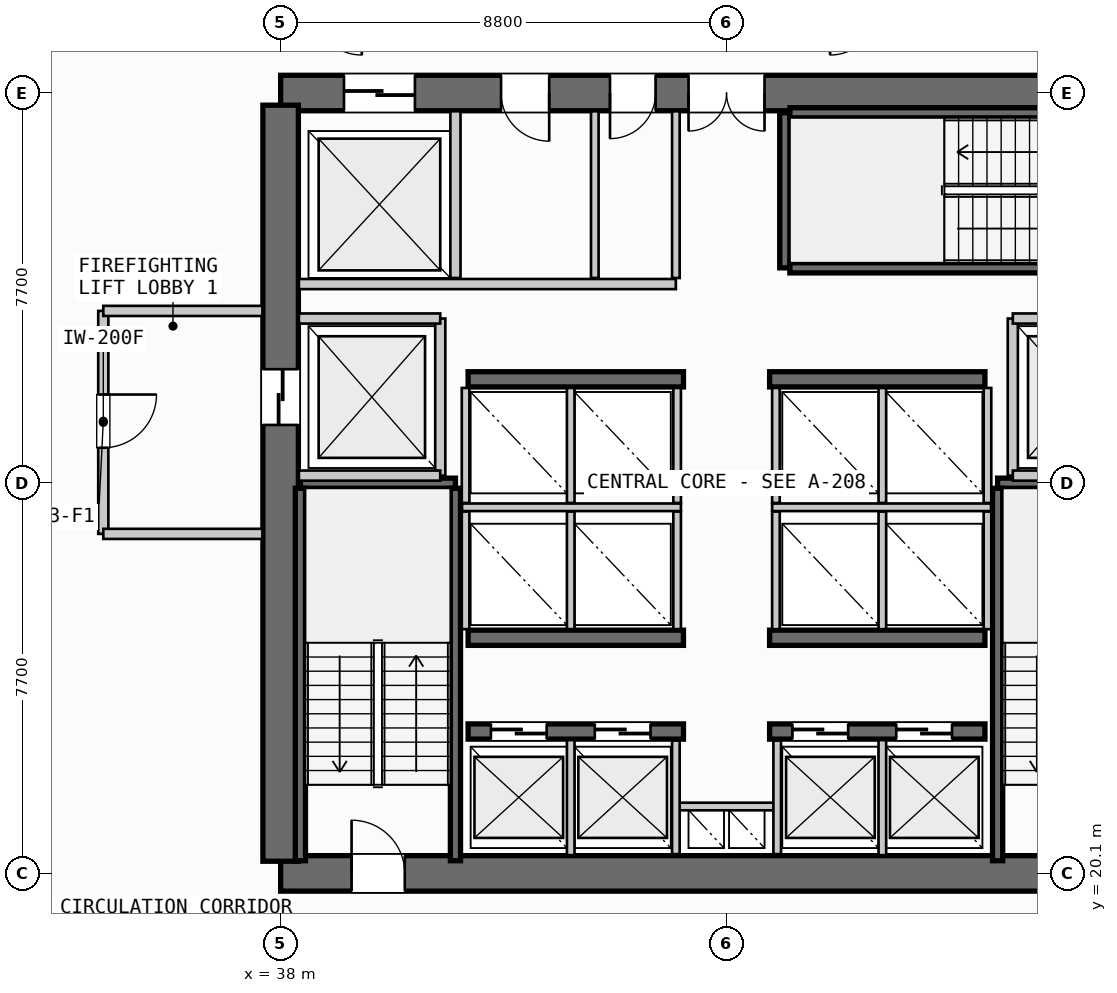
"""IFC4 building model, lengths in metres.
Left out: names, types, materials, properties, quantities, classifications, styles, units other than length and angle.
Written with IfcOpenShell. Run it as: python <this file> out.ifc"""

import sys

from ifc_helpers import new_model, si_unit, direction, frame, frame_2d, origin, place, context, subcontext, project, spatial, rectangle, extrude, source, transform, mapped, element, fill, save


model = new_model("IFC4")
c1 = context("Model", 3, precision=1e-05, world=origin(), true_north=direction((0.0, 1.0)))
c2 = subcontext(c1, "Body", "Model", "MODEL_VIEW")
j1 = project(units=[si_unit("LENGTHUNIT", "METRE"), si_unit("PLANEANGLEUNIT", "RADIAN")], contexts=[c1])
p1 = place(None, origin())
s1 = spatial("IfcSite", under=j1, at=p1, CompositionType="ELEMENT")
p2 = place(p1, origin())
s2 = spatial("IfcBuilding", under=s1, at=p2, CompositionType="ELEMENT")
p3 = place(p2, frame((0.0, 0.0, 56.2)))
s3 = spatial("IfcBuildingStorey", under=s2, at=p3, CompositionType="ELEMENT", Elevation=56.2)
p4 = place(p3, frame((38.0, 20.1, 0.0), z_axis=(0.0, 0.0, 1.0), x_axis=(1.0, 0.0, 0.0)))
e1 = element("IfcWall", 1, at=p4, inside=s3, PredefinedType="SHEAR", context=c2, shape_type="SweptSolid", body=[
    extrude(rectangle(XDim=17.6, YDim=0.7, at=frame_2d((8.8, 0.0))), origin(), (0.0, 0.0, 1.0), 3.55),
])
p5 = place(p4, frame((1.4, 0.0, 0.0)))
e2 = element("IfcOpeningElement", 2, at=p5, cuts=e1, PredefinedType="OPENING", context=c2, shape_type="SweptSolid", body=[
    extrude(rectangle(XDim=1.05, YDim=2.15, at=frame_2d((0.525, 1.075))), frame((0.0, 0.36, 0.0), z_axis=(0.0, -1.0, 0.0), x_axis=(1.0, 0.0, 0.0)), (0.0, 0.0, 1.0), 0.72),
])
p6 = place(p4, frame((15.15, 0.0, 0.0)))
e3 = element("IfcOpeningElement", 3, at=p6, cuts=e1, PredefinedType="OPENING", context=c2, shape_type="SweptSolid", body=[
    extrude(rectangle(XDim=1.05, YDim=2.15, at=frame_2d((0.525, 1.075))), frame((0.0, 0.36, 0.0), z_axis=(0.0, -1.0, 0.0), x_axis=(1.0, 0.0, 0.0)), (0.0, 0.0, 1.0), 0.72),
])
p7 = place(p3, frame((55.6, 35.5, 0.0), z_axis=(0.0, 0.0, 1.0), x_axis=(-1.0, 0.0, 0.0)))
e4 = element("IfcWall", 4, at=p7, inside=s3, PredefinedType="SHEAR", context=c2, shape_type="SweptSolid", body=[
    extrude(rectangle(XDim=17.6, YDim=0.7, at=frame_2d((8.8, 0.0))), origin(), (0.0, 0.0, 1.0), 3.55),
])
p8 = place(p7, frame((8.05, 0.0, 0.0)))
e5 = element("IfcOpeningElement", 5, at=p8, cuts=e4, PredefinedType="OPENING", context=c2, shape_type="SweptSolid", body=[
    extrude(rectangle(XDim=1.5, YDim=2.2, at=frame_2d((0.75, 1.1))), frame((0.0, 0.36, 0.0), z_axis=(0.0, -1.0, 0.0), x_axis=(1.0, 0.0, 0.0)), (0.0, 0.0, 1.0), 0.72),
])
p9 = place(p7, frame((14.95, 0.0, 0.0)))
e6 = element("IfcOpeningElement", 6, at=p9, cuts=e4, PredefinedType="OPENING", context=c2, shape_type="SweptSolid", body=[
    extrude(rectangle(XDim=1.4, YDim=2.3, at=frame_2d((0.7, 1.15))), frame((0.0, 0.36, 0.0), z_axis=(0.0, -1.0, 0.0), x_axis=(1.0, 0.0, 0.0)), (0.0, 0.0, 1.0), 0.72),
])
p10 = place(p7, frame((12.3, 0.0, 0.0)))
e7 = element("IfcOpeningElement", 7, at=p10, cuts=e4, PredefinedType="OPENING", context=c2, shape_type="SweptSolid", body=[
    extrude(rectangle(XDim=0.95, YDim=2.15, at=frame_2d((0.475, 1.075))), frame((0.0, 0.36, 0.0), z_axis=(0.0, -1.0, 0.0), x_axis=(1.0, 0.0, 0.0)), (0.0, 0.0, 1.0), 0.72),
])
p11 = place(p7, frame((10.2, 0.0, 0.0)))
e8 = element("IfcOpeningElement", 8, at=p11, cuts=e4, PredefinedType="OPENING", context=c2, shape_type="SweptSolid", body=[
    extrude(rectangle(XDim=0.9, YDim=2.15, at=frame_2d((0.45, 1.075))), frame((0.0, 0.36, 0.0), z_axis=(0.0, -1.0, 0.0), x_axis=(1.0, 0.0, 0.0)), (0.0, 0.0, 1.0), 0.72),
])
p12 = place(p3, frame((38.0, 35.26, 0.0), z_axis=(0.0, 0.0, 1.0), x_axis=(0.0, -1.0, 0.0)))
e9 = element("IfcWall", 9, at=p12, inside=s3, PredefinedType="SHEAR", context=c2, shape_type="SweptSolid", body=[
    extrude(rectangle(XDim=14.92, YDim=0.7, at=frame_2d((7.46, 0.0))), origin(), (0.0, 0.0, 1.0), 3.55),
])
p13 = place(p12, frame((5.21, 0.0, 0.0)))
e10 = element("IfcOpeningElement", 10, at=p13, cuts=e9, PredefinedType="OPENING", context=c2, shape_type="SweptSolid", body=[
    extrude(rectangle(XDim=1.1, YDim=2.2, at=frame_2d((0.55, 1.1))), frame((0.0, 0.36, 0.0), z_axis=(0.0, -1.0, 0.0), x_axis=(1.0, 0.0, 0.0)), (0.0, 0.0, 1.0), 0.72),
])
p14 = place(p3, frame((41.7, 22.9, 0.0), z_axis=(0.0, 0.0, 1.0), x_axis=(1.0, 0.0, 0.0)))
e11 = element("IfcWall", 11, at=p14, inside=s3, PredefinedType="SHEAR", context=c2, shape_type="SweptSolid", body=[
    extrude(rectangle(XDim=4.25, YDim=0.3, at=frame_2d((2.125, 0.0))), origin(), (0.0, 0.0, 1.0), 3.55),
])
p15 = place(p14, frame((0.45, 0.0, 0.0)))
e12 = element("IfcOpeningElement", 12, at=p15, cuts=e11, PredefinedType="OPENING", context=c2, shape_type="SweptSolid", body=[
    extrude(rectangle(XDim=1.1, YDim=2.2, at=frame_2d((0.55, 1.1))), frame((0.0, 0.16, 0.0), z_axis=(0.0, -1.0, 0.0), x_axis=(1.0, 0.0, 0.0)), (0.0, 0.0, 1.0), 0.32),
])
p16 = place(p14, frame((2.5, 0.0, 0.0)))
e13 = element("IfcOpeningElement", 13, at=p16, cuts=e11, PredefinedType="OPENING", context=c2, shape_type="SweptSolid", body=[
    extrude(rectangle(XDim=1.1, YDim=2.2, at=frame_2d((0.55, 1.1))), frame((0.0, 0.16, 0.0), z_axis=(0.0, -1.0, 0.0), x_axis=(1.0, 0.0, 0.0)), (0.0, 0.0, 1.0), 0.32),
])
p17 = place(p3, frame((47.65, 22.9, 0.0), z_axis=(0.0, 0.0, 1.0), x_axis=(1.0, 0.0, 0.0)))
e14 = element("IfcWall", 14, at=p17, inside=s3, PredefinedType="SHEAR", context=c2, shape_type="SweptSolid", body=[
    extrude(rectangle(XDim=4.25, YDim=0.3, at=frame_2d((2.125, 0.0))), origin(), (0.0, 0.0, 1.0), 3.55),
])
p18 = place(p17, frame((0.45, 0.0, 0.0)))
e15 = element("IfcOpeningElement", 15, at=p18, cuts=e14, PredefinedType="OPENING", context=c2, shape_type="SweptSolid", body=[
    extrude(rectangle(XDim=1.1, YDim=2.2, at=frame_2d((0.55, 1.1))), frame((0.0, 0.16, 0.0), z_axis=(0.0, -1.0, 0.0), x_axis=(1.0, 0.0, 0.0)), (0.0, 0.0, 1.0), 0.32),
])
p19 = place(p17, frame((2.5, 0.0, 0.0)))
e16 = element("IfcOpeningElement", 16, at=p19, cuts=e14, PredefinedType="OPENING", context=c2, shape_type="SweptSolid", body=[
    extrude(rectangle(XDim=1.1, YDim=2.2, at=frame_2d((0.55, 1.1))), frame((0.0, 0.16, 0.0), z_axis=(0.0, -1.0, 0.0), x_axis=(1.0, 0.0, 0.0)), (0.0, 0.0, 1.0), 0.32),
])
for number, where, z_axis, x_axis in (
    (17, (41.7, 24.75, 0.0), (0.0, 0.0, 1.0), (1.0, 0.0, 0.0)),
    (18, (47.65, 24.75, 0.0), (0.0, 0.0, 1.0), (1.0, 0.0, 0.0)),
    (19, (41.7, 29.85, 0.0), (0.0, 0.0, 1.0), (1.0, 0.0, 0.0)),
    (20, (47.65, 29.85, 0.0), (0.0, 0.0, 1.0), (1.0, 0.0, 0.0)),
):
    element("IfcWall", number, at=place(p3, frame(where, z_axis=z_axis, x_axis=x_axis)), inside=s3, PredefinedType="SHEAR", context=c2, shape_type="SweptSolid", body=[
        extrude(rectangle(XDim=4.25, YDim=0.3, at=frame_2d((2.125, 0.0))), origin(), (0.0, 0.0, 1.0), 3.55),
    ])
p20 = place(p3, frame((38.39, 27.8, 0.0), z_axis=(0.0, 0.0, 1.0), x_axis=(1.0, 0.0, 0.0)))
e21 = element("IfcWall", 21, at=p20, inside=s3, PredefinedType="SHEAR", context=c2, shape_type="SweptSolid", body=[
    extrude(rectangle(XDim=3.06, YDim=0.2, at=frame_2d((1.53, 0.0))), origin(), (0.0, 0.0, 1.0), 3.55),
])
for number, where, z_axis, x_axis in (
    (22, (41.45, 27.7, 0.0), (0.0, 0.0, 1.0), (0.0, -1.0, 0.0)),
    (23, (38.39, 20.35, 0.0), (0.0, 0.0, 1.0), (0.0, 1.0, 0.0)),
):
    element("IfcWall", number, at=place(p3, frame(where, z_axis=z_axis, x_axis=x_axis)), inside=s3, PredefinedType="SHEAR", context=c2, shape_type="SweptSolid", body=[
        extrude(rectangle(XDim=7.35, YDim=0.2, at=frame_2d((3.675, 0.0))), origin(), (0.0, 0.0, 1.0), 3.55),
    ])
p21 = place(p3, frame((52.15, 27.8, 0.0), z_axis=(0.0, 0.0, 1.0), x_axis=(1.0, 0.0, 0.0)))
e24 = element("IfcWall", 24, at=p21, inside=s3, PredefinedType="SHEAR", context=c2, shape_type="SweptSolid", body=[
    extrude(rectangle(XDim=3.06, YDim=0.2, at=frame_2d((1.53, 0.0))), origin(), (0.0, 0.0, 1.0), 3.55),
])
p22 = place(p3, frame((52.15, 20.35, 0.0), z_axis=(0.0, 0.0, 1.0), x_axis=(0.0, 1.0, 0.0)))
e25 = element("IfcWall", 25, at=p22, inside=s3, PredefinedType="SHEAR", context=c2, shape_type="SweptSolid", body=[
    extrude(rectangle(XDim=7.35, YDim=0.2, at=frame_2d((3.675, 0.0))), origin(), (0.0, 0.0, 1.0), 3.55),
])
p23 = place(p3, frame((47.95, 32.05, 0.0), z_axis=(0.0, 0.0, 1.0), x_axis=(0.0, 1.0, 0.0)))
e26 = element("IfcWall", 26, at=p23, inside=s3, PredefinedType="SHEAR", context=c2, shape_type="SweptSolid", body=[
    extrude(rectangle(XDim=3.06, YDim=0.2, at=frame_2d((1.53, 0.0))), origin(), (0.0, 0.0, 1.0), 3.55),
])
for number, where, z_axis, x_axis in (
    (27, (48.05, 35.11, 0.0), (0.0, 0.0, 1.0), (1.0, 0.0, 0.0)),
    (28, (55.4, 32.05, 0.0), (0.0, 0.0, 1.0), (-1.0, 0.0, 0.0)),
):
    element("IfcWall", number, at=place(p3, frame(where, z_axis=z_axis, x_axis=x_axis)), inside=s3, PredefinedType="SHEAR", context=c2, shape_type="SweptSolid", body=[
        extrude(rectangle(XDim=7.35, YDim=0.2, at=frame_2d((3.675, 0.0))), origin(), (0.0, 0.0, 1.0), 3.55),
    ])
p24 = place(p3, frame((45.8, 21.42, 0.0), z_axis=(0.0, 0.0, 1.0), x_axis=(1.0, 0.0, 0.0)))
e29 = element("IfcWall", 29, at=p24, inside=s3, PredefinedType="PARTITIONING", context=c2, shape_type="SweptSolid", body=[
    extrude(rectangle(XDim=2.0, YDim=0.15, at=frame_2d((1.0, 0.0))), origin(), (0.0, 0.0, 1.0), 2.645),
])
for number, where, z_axis, x_axis in (
    (30, (45.8, 20.48, 0.0), (0.0, 0.0, 1.0), (0.0, 1.0, 0.0)),
    (31, (47.8, 20.48, 0.0), (0.0, 0.0, 1.0), (0.0, 1.0, 0.0)),
):
    element("IfcWall", number, at=place(p3, frame(where, z_axis=z_axis, x_axis=x_axis)), inside=s3, PredefinedType="PARTITIONING", context=c2, shape_type="SweptSolid", body=[
        extrude(rectangle(XDim=2.24, YDim=0.15, at=frame_2d((1.12, 0.0))), origin(), (0.0, 0.0, 1.0), 2.645),
    ])
p25 = place(p3, frame((41.15, 27.95, 0.0), z_axis=(0.0, 0.0, 1.0), x_axis=(0.0, 1.0, 0.0)))
e32 = element("IfcWall", 32, at=p25, inside=s3, PredefinedType="PARTITIONING", context=c2, shape_type="SweptSolid", body=[
    extrude(rectangle(XDim=3.1, YDim=0.2, at=frame_2d((1.55, 0.0))), origin(), (0.0, 0.0, 1.0), 2.645),
])
for number, where, z_axis, x_axis in (
    (33, (38.36, 27.95, 0.0), (0.0, 0.0, 1.0), (1.0, 0.0, 0.0)),
    (34, (38.36, 31.05, 0.0), (0.0, 0.0, 1.0), (1.0, 0.0, 0.0)),
):
    element("IfcWall", number, at=place(p3, frame(where, z_axis=z_axis, x_axis=x_axis)), inside=s3, PredefinedType="PARTITIONING", context=c2, shape_type="SweptSolid", body=[
        extrude(rectangle(XDim=2.79, YDim=0.2, at=frame_2d((1.395, 0.0))), origin(), (0.0, 0.0, 1.0), 2.645),
    ])
p26 = place(p3, frame((34.5, 31.2, 0.0), z_axis=(0.0, 0.0, 1.0), x_axis=(0.0, -1.0, 0.0)))
e35 = element("IfcWall", 35, at=p26, inside=s3, PredefinedType="PARTITIONING", context=c2, shape_type="SweptSolid", body=[
    extrude(rectangle(XDim=4.4, YDim=0.2, at=frame_2d((2.2, 0.0))), origin(), (0.0, 0.0, 1.0), 2.645),
])
p27 = place(p26, frame((1.65, 0.0, 0.0)))
e36 = element("IfcOpeningElement", 36, at=p27, cuts=e35, PredefinedType="OPENING", context=c2, shape_type="SweptSolid", body=[
    extrude(rectangle(XDim=1.05, YDim=2.15, at=frame_2d((0.525, 1.075))), frame((0.0, 0.11, 0.0), z_axis=(0.0, -1.0, 0.0), x_axis=(1.0, 0.0, 0.0)), (0.0, 0.0, 1.0), 0.22),
])
for number, where, z_axis, x_axis in (
    (37, (34.5, 26.8, 0.0), (0.0, 0.0, 1.0), (1.0, 0.0, 0.0)),
    (38, (34.5, 31.2, 0.0), (0.0, 0.0, 1.0), (1.0, 0.0, 0.0)),
):
    element("IfcWall", number, at=place(p3, frame(where, z_axis=z_axis, x_axis=x_axis)), inside=s3, PredefinedType="PARTITIONING", context=c2, shape_type="SweptSolid", body=[
        extrude(rectangle(XDim=3.14, YDim=0.2, at=frame_2d((1.57, 0.0))), origin(), (0.0, 0.0, 1.0), 2.645),
    ])
p28 = place(p3, frame((52.45, 27.95, 0.0), z_axis=(0.0, 0.0, 1.0), x_axis=(0.0, 1.0, 0.0)))
e39 = element("IfcWall", 39, at=p28, inside=s3, PredefinedType="PARTITIONING", context=c2, shape_type="SweptSolid", body=[
    extrude(rectangle(XDim=3.1, YDim=0.2, at=frame_2d((1.55, 0.0))), origin(), (0.0, 0.0, 1.0), 2.645),
])
for number, where, z_axis, x_axis in (
    (40, (52.45, 27.95, 0.0), (0.0, 0.0, 1.0), (1.0, 0.0, 0.0)),
    (41, (52.45, 31.05, 0.0), (0.0, 0.0, 1.0), (1.0, 0.0, 0.0)),
):
    element("IfcWall", number, at=place(p3, frame(where, z_axis=z_axis, x_axis=x_axis)), inside=s3, PredefinedType="PARTITIONING", context=c2, shape_type="SweptSolid", body=[
        extrude(rectangle(XDim=2.79, YDim=0.2, at=frame_2d((1.395, 0.0))), origin(), (0.0, 0.0, 1.0), 2.645),
    ])
for number, where, z_axis, x_axis in (
    (42, (43.725, 20.46, 0.0), (0.0, 0.0, 1.0), (0.0, 1.0, 0.0)),
    (43, (49.875, 20.46, 0.0), (0.0, 0.0, 1.0), (0.0, 1.0, 0.0)),
):
    element("IfcWall", number, at=place(p3, frame(where, z_axis=z_axis, x_axis=x_axis)), inside=s3, PredefinedType="PARTITIONING", context=c2, shape_type="SweptSolid", body=[
        extrude(rectangle(XDim=2.27, YDim=0.15, at=frame_2d((1.135, 0.0))), origin(), (0.0, 0.0, 1.0), 2.645),
    ])
p29 = place(p3, frame((41.58, 27.325, 0.0), z_axis=(0.0, 0.0, 1.0), x_axis=(1.0, 0.0, 0.0)))
e44 = element("IfcWall", 44, at=p29, inside=s3, PredefinedType="PARTITIONING", context=c2, shape_type="SweptSolid", body=[
    extrude(rectangle(XDim=4.32, YDim=0.15, at=frame_2d((2.16, 0.0))), origin(), (0.0, 0.0, 1.0), 2.645),
])
p30 = place(p3, frame((47.7, 27.325, 0.0), z_axis=(0.0, 0.0, 1.0), x_axis=(1.0, 0.0, 0.0)))
e45 = element("IfcWall", 45, at=p30, inside=s3, PredefinedType="PARTITIONING", context=c2, shape_type="SweptSolid", body=[
    extrude(rectangle(XDim=4.32, YDim=0.15, at=frame_2d((2.16, 0.0))), origin(), (0.0, 0.0, 1.0), 2.645),
])
for number, where, z_axis, x_axis in (
    (46, (41.65, 24.92, 0.0), (0.0, 0.0, 1.0), (0.0, 1.0, 0.0)),
    (47, (43.725, 24.92, 0.0), (0.0, 0.0, 1.0), (0.0, 1.0, 0.0)),
    (48, (45.825, 24.92, 0.0), (0.0, 0.0, 1.0), (0.0, 1.0, 0.0)),
    (49, (47.775, 24.92, 0.0), (0.0, 0.0, 1.0), (0.0, 1.0, 0.0)),
    (50, (49.875, 24.92, 0.0), (0.0, 0.0, 1.0), (0.0, 1.0, 0.0)),
    (51, (51.95, 24.92, 0.0), (0.0, 0.0, 1.0), (0.0, 1.0, 0.0)),
):
    element("IfcWall", number, at=place(p3, frame(where, z_axis=z_axis, x_axis=x_axis)), inside=s3, PredefinedType="PARTITIONING", context=c2, shape_type="SweptSolid", body=[
        extrude(rectangle(XDim=2.32, YDim=0.15, at=frame_2d((1.16, 0.0))), origin(), (0.0, 0.0, 1.0), 2.645),
    ])
for number, where, z_axis, x_axis in (
    (52, (41.65, 27.41, 0.0), (0.0, 0.0, 1.0), (0.0, 1.0, 0.0)),
    (53, (43.725, 27.41, 0.0), (0.0, 0.0, 1.0), (0.0, 1.0, 0.0)),
    (54, (45.825, 27.41, 0.0), (0.0, 0.0, 1.0), (0.0, 1.0, 0.0)),
    (55, (47.775, 27.41, 0.0), (0.0, 0.0, 1.0), (0.0, 1.0, 0.0)),
    (56, (49.875, 27.41, 0.0), (0.0, 0.0, 1.0), (0.0, 1.0, 0.0)),
    (57, (51.95, 27.41, 0.0), (0.0, 0.0, 1.0), (0.0, 1.0, 0.0)),
):
    element("IfcWall", number, at=place(p3, frame(where, z_axis=z_axis, x_axis=x_axis)), inside=s3, PredefinedType="PARTITIONING", context=c2, shape_type="SweptSolid", body=[
        extrude(rectangle(XDim=2.27, YDim=0.15, at=frame_2d((1.135, 0.0))), origin(), (0.0, 0.0, 1.0), 2.645),
    ])
p31 = place(p3, frame((41.45, 31.85, 0.0), z_axis=(0.0, 0.0, 1.0), x_axis=(0.0, 1.0, 0.0)))
e58 = element("IfcWall", 58, at=p31, inside=s3, PredefinedType="PARTITIONING", context=c2, shape_type="SweptSolid", body=[
    extrude(rectangle(XDim=3.29, YDim=0.2, at=frame_2d((1.645, 0.0))), origin(), (0.0, 0.0, 1.0), 2.645),
])
p32 = place(p3, frame((38.36, 31.73, 0.0), z_axis=(0.0, 0.0, 1.0), x_axis=(1.0, 0.0, 0.0)))
e59 = element("IfcWall", 59, at=p32, inside=s3, PredefinedType="PARTITIONING", context=c2, shape_type="SweptSolid", body=[
    extrude(rectangle(XDim=7.44, YDim=0.2, at=frame_2d((3.72, 0.0))), origin(), (0.0, 0.0, 1.0), 2.645),
])
p33 = place(p3, frame((45.8, 31.85, 0.0), z_axis=(0.0, 0.0, 1.0), x_axis=(0.0, 1.0, 0.0)))
e60 = element("IfcWall", 60, at=p33, inside=s3, PredefinedType="PARTITIONING", context=c2, shape_type="SweptSolid", body=[
    extrude(rectangle(XDim=3.29, YDim=0.15, at=frame_2d((1.645, 0.0))), origin(), (0.0, 0.0, 1.0), 2.645),
])
p34 = place(p3, frame((44.2, 31.85, 0.0), z_axis=(0.0, 0.0, 1.0), x_axis=(0.0, 1.0, 0.0)))
e61 = element("IfcWall", 61, at=p34, inside=s3, PredefinedType="PLUMBINGWALL", context=c2, shape_type="SweptSolid", body=[
    extrude(rectangle(XDim=3.29, YDim=0.15, at=frame_2d((1.645, 0.0))), origin(), (0.0, 0.0, 1.0), 2.645),
])
m1 = source(origin(), c2, "Body", "SweptSolid", [
    extrude(rectangle(XDim=1.05, YDim=2.15, at=frame_2d((0.525, 1.075))), frame((0.0, 0.025, 0.0), z_axis=(0.0, -1.0, 0.0), x_axis=(1.0, 0.0, 0.0)), (0.0, 0.0, 1.0), 0.05),
])
p35 = place(p5, origin())
e62 = element("IfcDoor", 62, at=p35, inside=s3, OperationType="SINGLE_SWING_LEFT", PredefinedType="DOOR", context=c2, shape_type="MappedRepresentation", body=[
    mapped(m1, transform((0.0, 0.0, 0.0), scale=1.0)),
])
fill(e2, e62)
m2 = source(origin(), c2, "Body", "SweptSolid", [
    extrude(rectangle(XDim=1.5, YDim=2.2, at=frame_2d((0.75, 1.1))), frame((0.0, 0.025, 0.0), z_axis=(0.0, -1.0, 0.0), x_axis=(1.0, 0.0, 0.0)), (0.0, 0.0, 1.0), 0.05),
])
p36 = place(p8, origin())
e63 = element("IfcDoor", 63, at=p36, inside=s3, OperationType="DOUBLE_DOOR_SINGLE_SWING", PredefinedType="DOOR", context=c2, shape_type="MappedRepresentation", body=[
    mapped(m2, transform((0.0, 0.0, 0.0), scale=1.0)),
])
fill(e5, e63)
m3 = source(origin(), c2, "Body", "SweptSolid", [
    extrude(rectangle(XDim=1.1, YDim=2.2, at=frame_2d((0.55, 1.1))), frame((0.0, 0.025, 0.0), z_axis=(0.0, -1.0, 0.0), x_axis=(1.0, 0.0, 0.0)), (0.0, 0.0, 1.0), 0.05),
])
p37 = place(p13, origin())
e64 = element("IfcDoor", 64, at=p37, inside=s3, OperationType="SLIDING_TO_LEFT", PredefinedType="DOOR", context=c2, shape_type="MappedRepresentation", body=[
    mapped(m3, transform((0.0, 0.0, 0.0), scale=1.0)),
])
fill(e10, e64)
p38 = place(p15, origin())
e65 = element("IfcDoor", 65, at=p38, inside=s3, OperationType="SLIDING_TO_LEFT", PredefinedType="DOOR", context=c2, shape_type="MappedRepresentation", body=[
    mapped(m3, transform((0.0, 0.0, 0.0), scale=1.0)),
])
fill(e12, e65)
p39 = place(p16, origin())
e66 = element("IfcDoor", 66, at=p39, inside=s3, OperationType="SLIDING_TO_LEFT", PredefinedType="DOOR", context=c2, shape_type="MappedRepresentation", body=[
    mapped(m3, transform((0.0, 0.0, 0.0), scale=1.0)),
])
fill(e13, e66)
p40 = place(p18, origin())
e67 = element("IfcDoor", 67, at=p40, inside=s3, OperationType="SLIDING_TO_LEFT", PredefinedType="DOOR", context=c2, shape_type="MappedRepresentation", body=[
    mapped(m3, transform((0.0, 0.0, 0.0), scale=1.0)),
])
fill(e15, e67)
p41 = place(p19, origin())
e68 = element("IfcDoor", 68, at=p41, inside=s3, OperationType="SLIDING_TO_LEFT", PredefinedType="DOOR", context=c2, shape_type="MappedRepresentation", body=[
    mapped(m3, transform((0.0, 0.0, 0.0), scale=1.0)),
])
fill(e16, e68)
m4 = source(origin(), c2, "Body", "SweptSolid", [
    extrude(rectangle(XDim=1.4, YDim=2.3, at=frame_2d((0.7, 1.15))), frame((0.0, 0.025, 0.0), z_axis=(0.0, -1.0, 0.0), x_axis=(1.0, 0.0, 0.0)), (0.0, 0.0, 1.0), 0.05),
])
p42 = place(p9, origin())
e69 = element("IfcDoor", 69, at=p42, inside=s3, OperationType="SLIDING_TO_RIGHT", PredefinedType="DOOR", context=c2, shape_type="MappedRepresentation", body=[
    mapped(m4, transform((0.0, 0.0, 0.0), scale=1.0)),
])
fill(e6, e69)
m5 = source(origin(), c2, "Body", "SweptSolid", [
    extrude(rectangle(XDim=0.95, YDim=2.15, at=frame_2d((0.475, 1.075))), frame((0.0, 0.025, 0.0), z_axis=(0.0, -1.0, 0.0), x_axis=(1.0, 0.0, 0.0)), (0.0, 0.0, 1.0), 0.05),
])
p43 = place(p10, origin())
e70 = element("IfcDoor", 70, at=p43, inside=s3, OperationType="SINGLE_SWING_LEFT", PredefinedType="DOOR", context=c2, shape_type="MappedRepresentation", body=[
    mapped(m5, transform((0.0, 0.0, 0.0), scale=1.0)),
])
fill(e7, e70)
m6 = source(origin(), c2, "Body", "SweptSolid", [
    extrude(rectangle(XDim=0.9, YDim=2.15, at=frame_2d((0.45, 1.075))), frame((0.0, 0.025, 0.0), z_axis=(0.0, -1.0, 0.0), x_axis=(1.0, 0.0, 0.0)), (0.0, 0.0, 1.0), 0.05),
])
p44 = place(p11, origin())
e71 = element("IfcDoor", 71, at=p44, inside=s3, OperationType="SINGLE_SWING_RIGHT", PredefinedType="DOOR", context=c2, shape_type="MappedRepresentation", body=[
    mapped(m6, transform((0.0, 0.0, 0.0), scale=1.0)),
])
fill(e8, e71)
p45 = place(p27, origin())
e72 = element("IfcDoor", 72, at=p45, inside=s3, OperationType="SINGLE_SWING_LEFT", PredefinedType="DOOR", context=c2, shape_type="MappedRepresentation", body=[
    mapped(m1, transform((0.0, 0.0, 0.0), scale=1.0)),
])
fill(e36, e72)
save(model, sys.argv[1])
